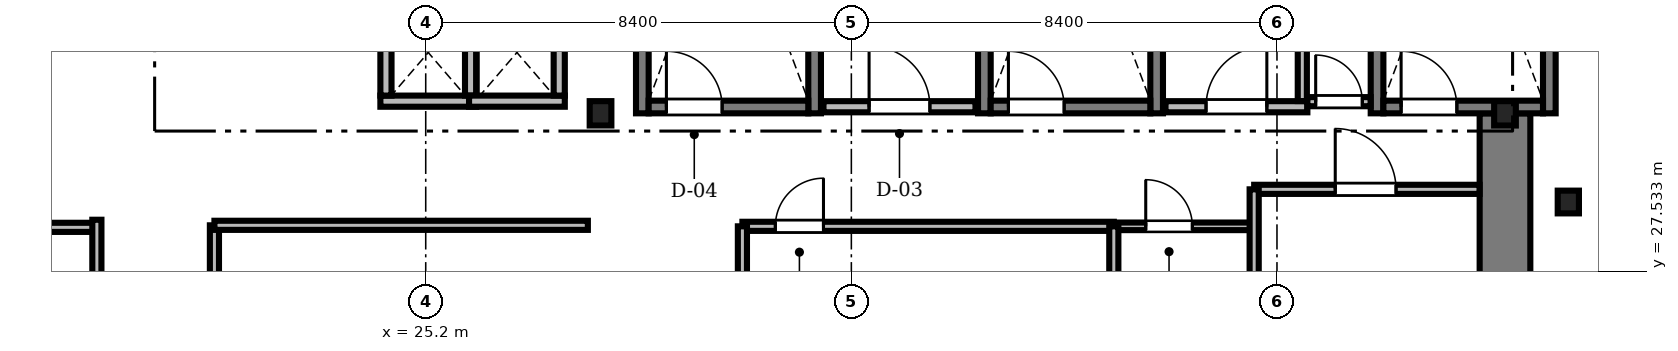
"""IFC4 building model, lengths in metres.
Left out: names, types, materials, properties, quantities, classifications, styles, units other than length and angle.
Written with IfcOpenShell. Run it as: python <this file> out.ifc"""

import sys

from ifc_helpers import new_model, si_unit, direction, frame, frame_2d, origin, origin_2d, place, context, subcontext, project, spatial, rectangle, i_section, extrude, source, transform, mapped, element, fill, save


model = new_model("IFC4")
c1 = context("Model", 3, precision=1e-05, world=origin(), true_north=direction((0.0, 1.0)))
c2 = subcontext(c1, "Body", "Model", "MODEL_VIEW")
j1 = project(units=[si_unit("LENGTHUNIT", "METRE"), si_unit("PLANEANGLEUNIT", "RADIAN")], contexts=[c1])
p1 = place(None, origin())
s1 = spatial("IfcSite", under=j1, at=p1, CompositionType="ELEMENT")
p2 = place(p1, origin())
s2 = spatial("IfcBuilding", under=s1, at=p2, CompositionType="ELEMENT")
p3 = place(p2, frame((0.0, 0.0, 60.45)))
s3 = spatial("IfcBuildingStorey", under=s2, at=p3, CompositionType="ELEMENT", Elevation=60.45)
m1 = source(origin(), c2, "Body", "SweptSolid", [
    extrude(rectangle(XDim=13.15, YDim=1.0, at=frame_2d((6.575, 0.0))), origin(), (0.0, 0.0, 1.0), 3.41),
])
p4 = place(p3, frame((46.5, 17.5, 0.0), z_axis=(0.0, 0.0, 1.0), x_axis=(0.0, 1.0, 0.0)))
e1 = element("IfcWall", 1, at=p4, inside=s3, PredefinedType="SHEAR", context=c2, shape_type="MappedRepresentation", body=[
    mapped(m1, transform((0.0, 0.0, 0.0), scale=1.0)),
])
m2 = source(origin(), c2, "Body", "SweptSolid", [
    extrude(i_section(OverallWidth=0.428, OverallDepth=0.481, WebThickness=0.04, FlangeThickness=0.063, FilletRadius=0.015, at=origin_2d()), origin(), (0.0, 0.0, 1.0), 3.41),
])
for number, where, z_axis, x_axis in (
    (2, (28.65, 30.65, 0.0), (0.0, 0.0, 1.0), (1.0, 0.0, 0.0)),
    (3, (46.5, 30.65, 0.0), (0.0, 0.0, 1.0), (1.0, 0.0, 0.0)),
):
    element("IfcColumn", number, at=place(p3, frame(where, z_axis=z_axis, x_axis=x_axis)), inside=s3, PredefinedType="COLUMN", context=c2, shape_type="MappedRepresentation", body=[
        mapped(m2, transform((0.0, 0.0, 0.0), scale=1.0)),
    ])
m3 = source(origin(), c2, "Body", "SweptSolid", [
    extrude(i_section(OverallWidth=0.419, OverallDepth=0.449, WebThickness=0.031, FlangeThickness=0.048, FilletRadius=0.015, at=origin_2d()), origin(), (0.0, 0.0, 1.0), 3.41),
])
p5 = place(p3, frame((47.75, 28.9, 0.0), z_axis=(0.0, 0.0, 1.0), x_axis=(1.0, 0.0, 0.0)))
e4 = element("IfcColumn", 4, at=p5, inside=s3, PredefinedType="COLUMN", context=c2, shape_type="MappedRepresentation", body=[
    mapped(m3, transform((0.0, 0.0, 0.0), scale=1.0)),
])
m4 = source(origin(), c2, "Body", "SweptSolid", [
    extrude(rectangle(XDim=9.15, YDim=0.25, at=frame_2d((4.575, 0.0))), origin(), (0.0, 0.0, 1.0), 3.45),
])
for number, where, z_axis, x_axis in (
    (5, (29.475, 30.65, 0.0), (0.0, 0.0, 1.0), (0.0, 1.0, 0.0)),
    (6, (32.875, 30.65, 0.0), (0.0, 0.0, 1.0), (0.0, 1.0, 0.0)),
):
    element("IfcWall", number, at=place(p3, frame(where, z_axis=z_axis, x_axis=x_axis)), inside=s3, PredefinedType="SOLIDWALL", context=c2, shape_type="MappedRepresentation", body=[
        mapped(m4, transform((0.0, 0.0, 0.0), scale=1.0)),
    ])
m5 = source(origin(), c2, "Body", "SweptSolid", [
    extrude(rectangle(XDim=3.15, YDim=0.25, at=frame_2d((1.575, 0.0))), origin(), (0.0, 0.0, 1.0), 3.45),
])
p6 = place(p3, frame((29.6, 30.775, 0.0), z_axis=(0.0, 0.0, 1.0), x_axis=(1.0, 0.0, 0.0)))
e7 = element("IfcWall", 7, at=p6, inside=s3, PredefinedType="SOLIDWALL", context=c2, shape_type="MappedRepresentation", body=[
    mapped(m5, transform((0.0, 0.0, 0.0), scale=1.0)),
])
m6 = source(origin(), c2, "Body", "SweptSolid", [
    extrude(rectangle(XDim=1.1, YDim=2.2, at=frame_2d((0.55, 1.1))), frame((0.0, 0.135, 0.0), z_axis=(0.0, -1.0, 0.0), x_axis=(1.0, 0.0, 0.0)), (0.0, 0.0, 1.0), 0.27),
])
p7 = place(p6, frame((0.35, 0.0, 0.0)))
e8 = element("IfcOpeningElement", 8, at=p7, cuts=e7, PredefinedType="OPENING", context=c2, shape_type="MappedRepresentation", body=[
    mapped(m6, transform((0.0, 0.0, 0.0), scale=1.0)),
])
for number, where, z_axis, x_axis in (
    (9, (36.225, 30.65, 0.0), (0.0, 0.0, 1.0), (0.0, 1.0, 0.0)),
    (10, (39.625, 30.65, 0.0), (0.0, 0.0, 1.0), (0.0, 1.0, 0.0)),
):
    element("IfcWall", number, at=place(p3, frame(where, z_axis=z_axis, x_axis=x_axis)), inside=s3, PredefinedType="SOLIDWALL", context=c2, shape_type="MappedRepresentation", body=[
        mapped(m4, transform((0.0, 0.0, 0.0), scale=1.0)),
    ])
p8 = place(p3, frame((36.35, 30.775, 0.0), z_axis=(0.0, 0.0, 1.0), x_axis=(1.0, 0.0, 0.0)))
e11 = element("IfcWall", 11, at=p8, inside=s3, PredefinedType="SOLIDWALL", context=c2, shape_type="MappedRepresentation", body=[
    mapped(m5, transform((0.0, 0.0, 0.0), scale=1.0)),
])
p9 = place(p8, frame((0.35, 0.0, 0.0)))
e12 = element("IfcOpeningElement", 12, at=p9, cuts=e11, PredefinedType="OPENING", context=c2, shape_type="MappedRepresentation", body=[
    mapped(m6, transform((0.0, 0.0, 0.0), scale=1.0)),
])
for number, where, z_axis, x_axis in (
    (13, (43.975, 30.65, 0.0), (0.0, 0.0, 1.0), (0.0, 1.0, 0.0)),
    (14, (47.375, 30.65, 0.0), (0.0, 0.0, 1.0), (0.0, 1.0, 0.0)),
):
    element("IfcWall", number, at=place(p3, frame(where, z_axis=z_axis, x_axis=x_axis)), inside=s3, PredefinedType="SOLIDWALL", context=c2, shape_type="MappedRepresentation", body=[
        mapped(m4, transform((0.0, 0.0, 0.0), scale=1.0)),
    ])
p10 = place(p3, frame((44.1, 30.775, 0.0), z_axis=(0.0, 0.0, 1.0), x_axis=(1.0, 0.0, 0.0)))
e15 = element("IfcWall", 15, at=p10, inside=s3, PredefinedType="SOLIDWALL", context=c2, shape_type="MappedRepresentation", body=[
    mapped(m5, transform((0.0, 0.0, 0.0), scale=1.0)),
])
p11 = place(p10, frame((0.35, 0.0, 0.0)))
e16 = element("IfcOpeningElement", 16, at=p11, cuts=e15, PredefinedType="OPENING", context=c2, shape_type="MappedRepresentation", body=[
    mapped(m6, transform((0.0, 0.0, 0.0), scale=1.0)),
])
m7 = source(origin(), c2, "Body", "SweptSolid", [
    extrude(rectangle(XDim=3.0, YDim=0.22, at=frame_2d((1.5, 0.0))), origin(), (0.0, 0.0, 1.0), 3.41),
])
p12 = place(p3, frame((33.05, 30.78, 0.0), z_axis=(0.0, 0.0, 1.0), x_axis=(1.0, 0.0, 0.0)))
e17 = element("IfcWall", 17, at=p12, inside=s3, PredefinedType="SOLIDWALL", context=c2, shape_type="MappedRepresentation", body=[
    mapped(m7, transform((0.0, 0.0, 0.0), scale=1.0)),
])
m8 = source(origin(), c2, "Body", "SweptSolid", [
    extrude(rectangle(XDim=1.2, YDim=2.2, at=frame_2d((0.6, 1.1))), frame((0.0, 0.12, 0.0), z_axis=(0.0, -1.0, 0.0), x_axis=(1.0, 0.0, 0.0)), (0.0, 0.0, 1.0), 0.24),
])
p13 = place(p12, frame((0.9, 0.0, 0.0)))
e18 = element("IfcOpeningElement", 18, at=p13, cuts=e17, PredefinedType="OPENING", context=c2, shape_type="MappedRepresentation", body=[
    mapped(m8, transform((0.0, 0.0, 0.0), scale=1.0)),
])
m9 = source(origin(), c2, "Body", "SweptSolid", [
    extrude(rectangle(XDim=2.8, YDim=0.22, at=frame_2d((1.4, 0.0))), origin(), (0.0, 0.0, 1.0), 3.41),
])
p14 = place(p3, frame((39.8, 30.78, 0.0), z_axis=(0.0, 0.0, 1.0), x_axis=(1.0, 0.0, 0.0)))
e19 = element("IfcWall", 19, at=p14, inside=s3, PredefinedType="SOLIDWALL", context=c2, shape_type="MappedRepresentation", body=[
    mapped(m9, transform((0.0, 0.0, 0.0), scale=1.0)),
])
p15 = place(p14, frame((0.8, 0.0, 0.0)))
e20 = element("IfcOpeningElement", 20, at=p15, cuts=e19, PredefinedType="OPENING", context=c2, shape_type="MappedRepresentation", body=[
    mapped(m8, transform((0.0, 0.0, 0.0), scale=1.0)),
])
m10 = source(origin(), c2, "Body", "SweptSolid", [
    extrude(rectangle(XDim=1.89, YDim=0.22, at=frame_2d((0.945, 0.0))), origin(), (0.0, 0.0, 1.0), 3.41),
])
p16 = place(p3, frame((24.305, 30.89, 0.0), z_axis=(0.0, 0.0, 1.0), x_axis=(1.0, 0.0, 0.0)))
e21 = element("IfcWall", 21, at=p16, inside=s3, PredefinedType="SOLIDWALL", context=c2, shape_type="MappedRepresentation", body=[
    mapped(m10, transform((0.0, 0.0, 0.0), scale=1.0)),
])
m11 = source(origin(), c2, "Body", "SweptSolid", [
    extrude(rectangle(XDim=1.7, YDim=0.22, at=frame_2d((0.85, 0.0))), origin(), (0.0, 0.0, 1.0), 3.41),
])
for number, where, z_axis, x_axis in (
    (22, (24.415, 31.0, 0.0), (0.0, 0.0, 1.0), (0.0, 1.0, 0.0)),
    (23, (26.085, 31.0, 0.0), (0.0, 0.0, 1.0), (0.0, 1.0, 0.0)),
):
    element("IfcWall", number, at=place(p3, frame(where, z_axis=z_axis, x_axis=x_axis)), inside=s3, PredefinedType="SOLIDWALL", context=c2, shape_type="MappedRepresentation", body=[
        mapped(m11, transform((0.0, 0.0, 0.0), scale=1.0)),
    ])
p17 = place(p3, frame((26.055, 30.89, 0.0), z_axis=(0.0, 0.0, 1.0), x_axis=(1.0, 0.0, 0.0)))
e24 = element("IfcWall", 24, at=p17, inside=s3, PredefinedType="SOLIDWALL", context=c2, shape_type="MappedRepresentation", body=[
    mapped(m10, transform((0.0, 0.0, 0.0), scale=1.0)),
])
p18 = place(p3, frame((27.835, 31.0, 0.0), z_axis=(0.0, 0.0, 1.0), x_axis=(0.0, 1.0, 0.0)))
e25 = element("IfcWall", 25, at=p18, inside=s3, PredefinedType="SOLIDWALL", context=c2, shape_type="MappedRepresentation", body=[
    mapped(m11, transform((0.0, 0.0, 0.0), scale=1.0)),
])
m12 = source(origin(), c2, "Body", "SweptSolid", [
    extrude(rectangle(XDim=11.94, YDim=0.18, at=frame_2d((5.97, 0.0))), origin(), (0.0, 0.0, 1.0), 2.802),
])
p19 = place(p3, frame((21.03, 16.5, 0.0), z_axis=(0.0, 0.0, 1.0), x_axis=(0.0, 1.0, 0.0)))
e26 = element("IfcWall", 26, at=p19, inside=s3, PredefinedType="PARTITIONING", context=c2, shape_type="MappedRepresentation", body=[
    mapped(m12, transform((0.0, 0.0, 0.0), scale=1.0)),
])
m13 = source(origin(), c2, "Body", "SweptSolid", [
    extrude(rectangle(XDim=1.05, YDim=2.2, at=frame_2d((0.525, 1.1))), frame((0.0, 0.1, 0.0), z_axis=(0.0, -1.0, 0.0), x_axis=(1.0, 0.0, 0.0)), (0.0, 0.0, 1.0), 0.2),
])
p20 = place(p19, frame((4.5, 0.0, 0.0)))
e27 = element("IfcOpeningElement", 27, at=p20, cuts=e26, PredefinedType="OPENING", context=c2, shape_type="MappedRepresentation", body=[
    mapped(m13, transform((0.0, 0.0, 0.0), scale=1.0)),
])
m14 = source(origin(), c2, "Body", "SweptSolid", [
    extrude(rectangle(XDim=7.33, YDim=0.18, at=frame_2d((3.665, 0.0))), origin(), (0.0, 0.0, 1.0), 3.042),
])
p21 = place(p3, frame((31.45, 28.42, 0.0), z_axis=(0.0, 0.0, 1.0), x_axis=(1.0, 0.0, 0.0)))
e28 = element("IfcWall", 28, at=p21, inside=s3, PredefinedType="PARTITIONING", context=c2, shape_type="MappedRepresentation", body=[
    mapped(m14, transform((0.0, 0.0, 0.0), scale=1.0)),
])
m15 = source(origin(), c2, "Body", "SweptSolid", [
    extrude(rectangle(XDim=0.95, YDim=2.15, at=frame_2d((0.475, 1.075))), frame((0.0, 0.1, 0.0), z_axis=(0.0, -1.0, 0.0), x_axis=(1.0, 0.0, 0.0)), (0.0, 0.0, 1.0), 0.2),
])
p22 = place(p21, frame((0.65, 0.0, 0.0)))
e29 = element("IfcOpeningElement", 29, at=p22, cuts=e28, PredefinedType="OPENING", context=c2, shape_type="MappedRepresentation", body=[
    mapped(m15, transform((0.0, 0.0, 0.0), scale=1.0)),
])
m16 = source(origin(), c2, "Body", "SweptSolid", [
    extrude(rectangle(XDim=4.448, YDim=0.18, at=frame_2d((2.224, 0.0))), origin(), (0.0, 0.0, 1.0), 3.042),
])
p23 = place(p3, frame((41.55, 29.15, 0.0), z_axis=(0.0, 0.0, 1.0), x_axis=(1.0, 0.0, 0.0)))
e30 = element("IfcWall", 30, at=p23, inside=s3, PredefinedType="PARTITIONING", context=c2, shape_type="MappedRepresentation", body=[
    mapped(m16, transform((0.0, 0.0, 0.0), scale=1.0)),
])
m17 = source(origin(), c2, "Body", "SweptSolid", [
    extrude(rectangle(XDim=1.2, YDim=2.2, at=frame_2d((0.6, 1.1))), frame((0.0, 0.1, 0.0), z_axis=(0.0, -1.0, 0.0), x_axis=(1.0, 0.0, 0.0)), (0.0, 0.0, 1.0), 0.2),
])
p24 = place(p23, frame((1.6, 0.0, 0.0)))
e31 = element("IfcOpeningElement", 31, at=p24, cuts=e30, PredefinedType="OPENING", context=c2, shape_type="MappedRepresentation", body=[
    mapped(m17, transform((0.0, 0.0, 0.0), scale=1.0)),
])
m18 = source(origin(), c2, "Body", "SweptSolid", [
    extrude(rectangle(XDim=2.74, YDim=0.15, at=frame_2d((1.37, 0.0))), origin(), (0.0, 0.0, 1.0), 3.41),
])
p25 = place(p3, frame((38.78, 28.42, 0.0), z_axis=(0.0, 0.0, 1.0), x_axis=(1.0, 0.0, 0.0)))
e32 = element("IfcWall", 32, at=p25, inside=s3, PredefinedType="PARTITIONING", context=c2, shape_type="MappedRepresentation", body=[
    mapped(m18, transform((0.0, 0.0, 0.0), scale=1.0)),
])
m19 = source(origin(), c2, "Body", "SweptSolid", [
    extrude(rectangle(XDim=0.92, YDim=2.1, at=frame_2d((0.46, 1.05))), frame((0.0, 0.085, 0.0), z_axis=(0.0, -1.0, 0.0), x_axis=(1.0, 0.0, 0.0)), (0.0, 0.0, 1.0), 0.17),
])
p26 = place(p25, frame((0.63, 0.0, 0.0)))
e33 = element("IfcOpeningElement", 33, at=p26, cuts=e32, PredefinedType="OPENING", context=c2, shape_type="MappedRepresentation", body=[
    mapped(m19, transform((0.0, 0.0, 0.0), scale=1.0)),
])
m20 = source(origin(), c2, "Body", "SweptSolid", [
    extrude(rectangle(XDim=1.248, YDim=0.18, at=frame_2d((0.624, 0.0))), origin(), (0.0, 0.0, 1.0), 3.41),
])
p27 = place(p3, frame((42.6, 30.88, 0.0), z_axis=(0.0, 0.0, 1.0), x_axis=(1.0, 0.0, 0.0)))
e34 = element("IfcWall", 34, at=p27, inside=s3, PredefinedType="PARTITIONING", context=c2, shape_type="MappedRepresentation", body=[
    mapped(m20, transform((0.0, 0.0, 0.0), scale=1.0)),
])
m21 = source(origin(), c2, "Body", "SweptSolid", [
    extrude(rectangle(XDim=0.92, YDim=2.1, at=frame_2d((0.46, 1.05))), frame((0.0, 0.1, 0.0), z_axis=(0.0, -1.0, 0.0), x_axis=(1.0, 0.0, 0.0)), (0.0, 0.0, 1.0), 0.2),
])
p28 = place(p27, frame((0.164, 0.0, 0.0)))
e35 = element("IfcOpeningElement", 35, at=p28, cuts=e34, PredefinedType="OPENING", context=c2, shape_type="MappedRepresentation", body=[
    mapped(m21, transform((0.0, 0.0, 0.0), scale=1.0)),
])
m22 = source(origin(), c2, "Body", "SweptSolid", [
    extrude(rectangle(XDim=16.48, YDim=0.18, at=frame_2d((8.24, 0.0))), origin(), (0.0, 0.0, 1.0), 2.652),
])
p29 = place(p3, frame((2.23, 28.4, 0.0), z_axis=(0.0, 0.0, 1.0), x_axis=(1.0, 0.0, 0.0)))
e36 = element("IfcWall", 36, at=p29, inside=s3, PredefinedType="PARTITIONING", context=c2, shape_type="MappedRepresentation", body=[
    mapped(m22, transform((0.0, 0.0, 0.0), scale=1.0)),
])
m23 = source(origin(), c2, "Body", "SweptSolid", [
    extrude(rectangle(XDim=13.89, YDim=0.18, at=frame_2d((6.945, 0.0))), origin(), (0.0, 0.0, 1.0), 2.802),
])
p30 = place(p3, frame((18.71, 14.66, 0.0), z_axis=(0.0, 0.0, 1.0), x_axis=(0.0, 1.0, 0.0)))
e37 = element("IfcWall", 37, at=p30, inside=s3, PredefinedType="PARTITIONING", context=c2, shape_type="MappedRepresentation", body=[
    mapped(m23, transform((0.0, 0.0, 0.0), scale=1.0)),
])
m24 = source(origin(), c2, "Body", "SweptSolid", [
    extrude(rectangle(XDim=7.37, YDim=0.18, at=frame_2d((3.685, 0.0))), origin(), (0.0, 0.0, 1.0), 3.41),
])
p31 = place(p3, frame((21.03, 28.44, 0.0), z_axis=(0.0, 0.0, 1.0), x_axis=(1.0, 0.0, 0.0)))
e38 = element("IfcWall", 38, at=p31, inside=s3, PredefinedType="PARTITIONING", context=c2, shape_type="MappedRepresentation", body=[
    mapped(m24, transform((0.0, 0.0, 0.0), scale=1.0)),
])
m25 = source(origin(), c2, "Body", "SweptSolid", [
    extrude(rectangle(XDim=2.758, YDim=0.18, at=frame_2d((1.379, 0.0))), origin(), (0.0, 0.0, 1.0), 3.41),
])
p32 = place(p3, frame((42.5, 30.892, 0.0), z_axis=(0.0, 0.0, 1.0), x_axis=(0.0, 1.0, 0.0)))
e39 = element("IfcWall", 39, at=p32, inside=s3, PredefinedType="PARTITIONING", context=c2, shape_type="MappedRepresentation", body=[
    mapped(m25, transform((0.0, 0.0, 0.0), scale=1.0)),
])
m26 = source(origin(), c2, "Body", "SweptSolid", [
    extrude(rectangle(XDim=2.35, YDim=0.18, at=frame_2d((1.175, 0.0))), origin(), (0.0, 0.0, 1.0), 2.802),
])
p33 = place(p3, frame((41.55, 26.8, 0.0), z_axis=(0.0, 0.0, 1.0), x_axis=(0.0, 1.0, 0.0)))
e40 = element("IfcWall", 40, at=p33, inside=s3, PredefinedType="PARTITIONING", context=c2, shape_type="MappedRepresentation", body=[
    mapped(m26, transform((0.0, 0.0, 0.0), scale=1.0)),
])
m27 = source(origin(), c2, "Body", "SweptSolid", [
    extrude(rectangle(XDim=1.6, YDim=0.18, at=frame_2d((0.8, 0.0))), origin(), (0.0, 0.0, 1.0), 2.952),
])
for number, where, z_axis, x_axis in (
    (41, (31.45, 26.82, 0.0), (0.0, 0.0, 1.0), (0.0, 1.0, 0.0)),
    (42, (38.78, 26.82, 0.0), (0.0, 0.0, 1.0), (0.0, 1.0, 0.0)),
):
    element("IfcWall", number, at=place(p3, frame(where, z_axis=z_axis, x_axis=x_axis)), inside=s3, PredefinedType="PARTITIONING", context=c2, shape_type="MappedRepresentation", body=[
        mapped(m27, transform((0.0, 0.0, 0.0), scale=1.0)),
    ])
m28 = source(origin(), c2, "Body", "SweptSolid", [
    extrude(rectangle(XDim=1.1, YDim=2.2, at=frame_2d((0.55, 1.1))), frame((0.0, 0.025, 0.0), z_axis=(0.0, -1.0, 0.0), x_axis=(1.0, 0.0, 0.0)), (0.0, 0.0, 1.0), 0.05),
])
p34 = place(p7, origin())
e43 = element("IfcDoor", 43, at=p34, inside=s3, OperationType="SINGLE_SWING_LEFT", PredefinedType="DOOR", context=c2, shape_type="MappedRepresentation", body=[
    mapped(m28, transform((0.0, 0.0, 0.0), scale=1.0)),
])
fill(e8, e43)
p35 = place(p9, origin())
e44 = element("IfcDoor", 44, at=p35, inside=s3, OperationType="SINGLE_SWING_LEFT", PredefinedType="DOOR", context=c2, shape_type="MappedRepresentation", body=[
    mapped(m28, transform((0.0, 0.0, 0.0), scale=1.0)),
])
fill(e12, e44)
p36 = place(p11, origin())
e45 = element("IfcDoor", 45, at=p36, inside=s3, OperationType="SINGLE_SWING_LEFT", PredefinedType="DOOR", context=c2, shape_type="MappedRepresentation", body=[
    mapped(m28, transform((0.0, 0.0, 0.0), scale=1.0)),
])
fill(e16, e45)
m29 = source(origin(), c2, "Body", "SweptSolid", [
    extrude(rectangle(XDim=1.2, YDim=2.2, at=frame_2d((0.6, 1.1))), frame((0.0, 0.025, 0.0), z_axis=(0.0, -1.0, 0.0), x_axis=(1.0, 0.0, 0.0)), (0.0, 0.0, 1.0), 0.05),
])
p37 = place(p13, origin())
e46 = element("IfcDoor", 46, at=p37, inside=s3, OperationType="SINGLE_SWING_LEFT", PredefinedType="DOOR", context=c2, shape_type="MappedRepresentation", body=[
    mapped(m29, transform((0.0, 0.0, 0.0), scale=1.0)),
])
fill(e18, e46)
p38 = place(p15, origin())
e47 = element("IfcDoor", 47, at=p38, inside=s3, OperationType="SINGLE_SWING_RIGHT", PredefinedType="DOOR", context=c2, shape_type="MappedRepresentation", body=[
    mapped(m29, transform((0.0, 0.0, 0.0), scale=1.0)),
])
fill(e20, e47)
m30 = source(origin(), c2, "Body", "SweptSolid", [
    extrude(rectangle(XDim=0.95, YDim=2.15, at=frame_2d((0.475, 1.075))), frame((0.0, 0.025, 0.0), z_axis=(0.0, -1.0, 0.0), x_axis=(1.0, 0.0, 0.0)), (0.0, 0.0, 1.0), 0.05),
])
p39 = place(p22, origin())
e48 = element("IfcDoor", 48, at=p39, inside=s3, OperationType="SINGLE_SWING_RIGHT", PredefinedType="DOOR", context=c2, shape_type="MappedRepresentation", body=[
    mapped(m30, transform((0.0, 0.0, 0.0), scale=1.0)),
])
fill(e29, e48)
p40 = place(p24, origin())
e49 = element("IfcDoor", 49, at=p40, inside=s3, OperationType="SINGLE_SWING_LEFT", PredefinedType="DOOR", context=c2, shape_type="MappedRepresentation", body=[
    mapped(m29, transform((0.0, 0.0, 0.0), scale=1.0)),
])
fill(e31, e49)
m31 = source(origin(), c2, "Body", "SweptSolid", [
    extrude(rectangle(XDim=0.92, YDim=2.1, at=frame_2d((0.46, 1.05))), frame((0.0, 0.025, 0.0), z_axis=(0.0, -1.0, 0.0), x_axis=(1.0, 0.0, 0.0)), (0.0, 0.0, 1.0), 0.05),
])
p41 = place(p26, origin())
e50 = element("IfcDoor", 50, at=p41, inside=s3, OperationType="SINGLE_SWING_LEFT", PredefinedType="DOOR", context=c2, shape_type="MappedRepresentation", body=[
    mapped(m31, transform((0.0, 0.0, 0.0), scale=1.0)),
])
fill(e33, e50)
p42 = place(p28, origin())
e51 = element("IfcDoor", 51, at=p42, inside=s3, OperationType="SINGLE_SWING_LEFT", PredefinedType="DOOR", context=c2, shape_type="MappedRepresentation", body=[
    mapped(m31, transform((0.0, 0.0, 0.0), scale=1.0)),
])
fill(e35, e51)
save(model, sys.argv[1])
